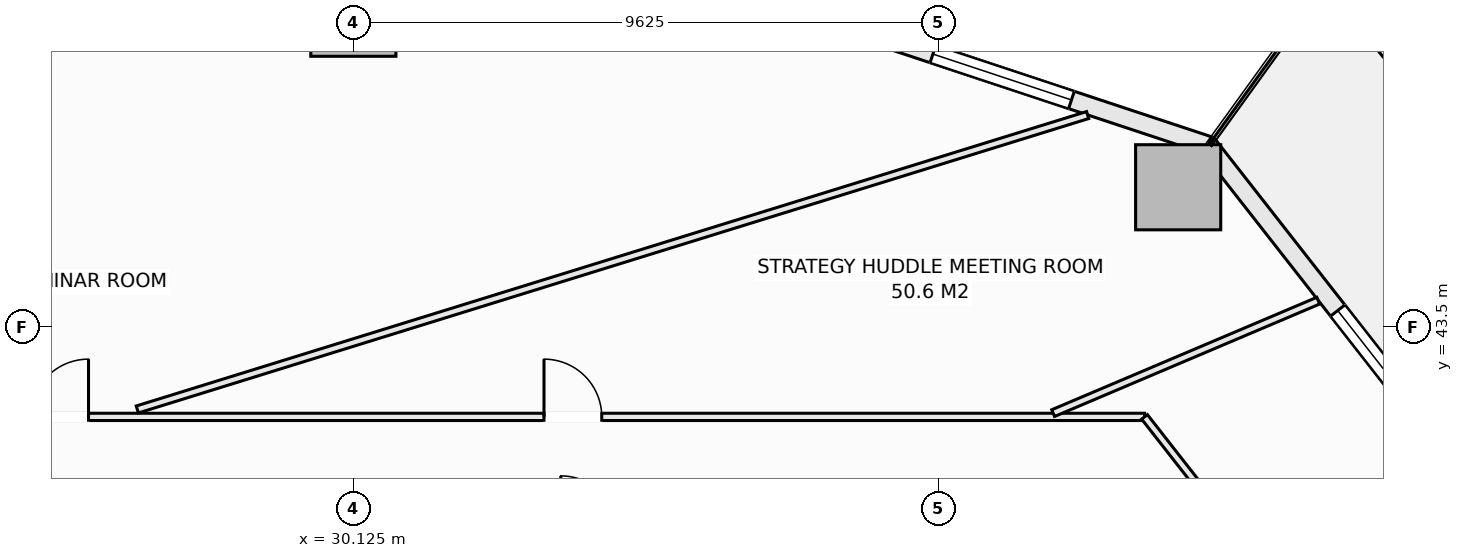
"""IFC4 building model, lengths in metres.
Left out: names, types, materials, properties, quantities, classifications, styles, units other than length and angle.
Written with IfcOpenShell. Run it as: python <this file> out.ifc"""

import sys

from ifc_helpers import new_model, si_unit, direction, frame, frame_2d, origin, origin_2d, place, context, subcontext, project, spatial, rectangle, extrude, element, fill, save


model = new_model("IFC4")
c1 = context("Model", 3, precision=1e-05, world=origin(), true_north=direction((0.0, 1.0)))
c2 = subcontext(c1, "Body", "Model", "MODEL_VIEW")
j1 = project(units=[si_unit("LENGTHUNIT", "METRE"), si_unit("PLANEANGLEUNIT", "RADIAN")], contexts=[c1])
p1 = place(None, origin())
s1 = spatial("IfcSite", under=j1, at=p1, CompositionType="ELEMENT")
p2 = place(p1, origin())
s2 = spatial("IfcBuilding", under=s1, at=p2, CompositionType="ELEMENT")
p3 = place(p2, frame((0.0, 0.0, 41.9)))
s3 = spatial("IfcBuildingStorey", under=s2, at=p3, CompositionType="ELEMENT", Elevation=41.9)
for number, where, z_axis, x_axis in (
    (1, (43.69, 45.796, -0.28), (0.0, 0.0, 1.0), (1.0, 0.0, 0.0)),
    (2, (30.125, 48.65, -0.28), (0.0, 0.0, 1.0), (1.0, 0.0, 0.0)),
):
    element("IfcColumn", number, at=place(p3, frame(where, z_axis=z_axis, x_axis=x_axis)), inside=s3, PredefinedType="COLUMN", context=c2, shape_type="SweptSolid", body=[
        extrude(rectangle(XDim=1.4, YDim=1.4, at=origin_2d()), origin(), (0.0, 0.0, 1.0), 3.85),
    ])
p4 = place(p3, frame((44.188, 46.486, 0.0), z_axis=(0.0, 0.0, 1.0), x_axis=(0.616421309777, -0.787416515482, 0.0)))
e3 = element("IfcWall", 3, at=p4, inside=s3, PredefinedType="SOLIDWALL", context=c2, shape_type="SweptSolid", body=[
    extrude(rectangle(XDim=6.696, YDim=0.3, at=frame_2d((3.348, 0.0))), origin(), (0.0, 0.0, 1.0), 3.093),
])
p5 = place(p4, frame((3.45, 0.0, 0.85)))
e4 = element("IfcOpeningElement", 4, at=p5, cuts=e3, PredefinedType="OPENING", context=c2, shape_type="SweptSolid", body=[
    extrude(rectangle(XDim=2.4, YDim=1.9, at=frame_2d((1.2, 0.95))), frame((0.0, 0.16, 0.0), z_axis=(0.0, -1.0, 0.0), x_axis=(1.0, 0.0, 0.0)), (0.0, 0.0, 1.0), 0.32),
])
p6 = place(p3, frame((37.404, 48.733, 0.0), z_axis=(0.0, 0.0, 1.0), x_axis=(0.949238715533, -0.31455661006, 0.0)))
e5 = element("IfcWall", 5, at=p6, inside=s3, PredefinedType="SOLIDWALL", context=c2, shape_type="SweptSolid", body=[
    extrude(rectangle(XDim=7.146, YDim=0.3, at=frame_2d((3.573, 0.0))), origin(), (0.0, 0.0, 1.0), 3.093),
])
p7 = place(p6, frame((2.373, 0.0, 0.85)))
e6 = element("IfcOpeningElement", 6, at=p7, cuts=e5, PredefinedType="OPENING", context=c2, shape_type="SweptSolid", body=[
    extrude(rectangle(XDim=2.4, YDim=1.9, at=frame_2d((1.2, 0.95))), frame((0.0, 0.16, 0.0), z_axis=(0.0, -1.0, 0.0), x_axis=(1.0, 0.0, 0.0)), (0.0, 0.0, 1.0), 0.32),
])
p8 = place(p3, frame((46.136, 49.251, 0.0), z_axis=(0.0, 0.0, 1.0), x_axis=(0.630997450658, -0.775784903993, 0.0)))
e7 = element("IfcWall", 7, at=p8, inside=s3, PredefinedType="PARAPET", context=c2, shape_type="SweptSolid", body=[
    extrude(rectangle(XDim=7.718, YDim=0.22, at=frame_2d((3.859, 0.0))), origin(), (0.0, 0.0, 1.0), 0.52),
])
p9 = place(p3, frame((23.462, 42.02, 0.0), z_axis=(0.0, 0.0, 1.0), x_axis=(1.0, 0.0, 0.0)))
e8 = element("IfcWall", 8, at=p9, inside=s3, PredefinedType="PARTITIONING", context=c2, shape_type="SweptSolid", body=[
    extrude(rectangle(XDim=19.675, YDim=0.12, at=frame_2d((9.837, 0.0))), origin(), (0.0, 0.0, 1.0), 3.57),
])
p10 = place(p9, frame((9.798, 0.0, 0.0)))
e9 = element("IfcOpeningElement", 9, at=p10, cuts=e8, PredefinedType="OPENING", context=c2, shape_type="SweptSolid", body=[
    extrude(rectangle(XDim=0.95, YDim=2.1, at=frame_2d((0.475, 1.05))), frame((0.0, 0.07, 0.0), z_axis=(0.0, -1.0, 0.0), x_axis=(1.0, 0.0, 0.0)), (0.0, 0.0, 1.0), 0.14),
])
p11 = place(p9, frame((1.357, 0.0, 0.0)))
e10 = element("IfcOpeningElement", 10, at=p11, cuts=e8, PredefinedType="OPENING", context=c2, shape_type="SweptSolid", body=[
    extrude(rectangle(XDim=0.95, YDim=2.1, at=frame_2d((0.475, 1.05))), frame((0.0, 0.07, 0.0), z_axis=(0.0, -1.0, 0.0), x_axis=(1.0, 0.0, 0.0)), (0.0, 0.0, 1.0), 0.14),
])
p12 = place(p3, frame((43.137, 42.02, 0.0), z_axis=(0.0, 0.0, 1.0), x_axis=(0.616441660183, -0.787400583941, 0.0)))
e11 = element("IfcWall", 11, at=p12, inside=s3, PredefinedType="PARTITIONING", context=c2, shape_type="SweptSolid", body=[
    extrude(rectangle(XDim=5.083, YDim=0.12, at=frame_2d((2.541, 0.0))), origin(), (0.0, 0.0, 1.0), 3.57),
])
p13 = place(p3, frame((41.634, 42.082, 0.0), z_axis=(0.0, 0.0, 1.0), x_axis=(0.920618281514, 0.39046380081, 0.0)))
e12 = element("IfcWall", 12, at=p13, inside=s3, PredefinedType="PARTITIONING", context=c2, shape_type="SweptSolid", body=[
    extrude(rectangle(XDim=4.736, YDim=0.12, at=frame_2d((2.368, 0.0))), origin(), (0.0, 0.0, 1.0), 3.57),
])
p14 = place(p3, frame((26.572, 42.142, 0.0), z_axis=(0.0, 0.0, 1.0), x_axis=(0.955220139549, 0.295896071282, 0.0)))
e13 = element("IfcWall", 13, at=p14, inside=s3, PredefinedType="PARTITIONING", context=c2, shape_type="SweptSolid", body=[
    extrude(rectangle(XDim=16.362, YDim=0.12, at=frame_2d((8.181, 0.0))), origin(), (0.0, 0.0, 1.0), 3.093),
])
p15 = place(p5, origin())
e14 = element("IfcWindow", 14, at=p15, inside=s3, PartitioningType="SINGLE_PANEL", PredefinedType="WINDOW", context=c2, shape_type="SweptSolid", body=[
    extrude(rectangle(XDim=2.4, YDim=1.9, at=frame_2d((1.2, 0.95))), frame((0.0, 0.03, 0.0), z_axis=(0.0, -1.0, 0.0), x_axis=(1.0, 0.0, 0.0)), (0.0, 0.0, 1.0), 0.06),
])
fill(e4, e14)
p16 = place(p7, origin())
e15 = element("IfcWindow", 15, at=p16, inside=s3, PartitioningType="SINGLE_PANEL", PredefinedType="WINDOW", context=c2, shape_type="SweptSolid", body=[
    extrude(rectangle(XDim=2.4, YDim=1.9, at=frame_2d((1.2, 0.95))), frame((0.0, 0.03, 0.0), z_axis=(0.0, -1.0, 0.0), x_axis=(1.0, 0.0, 0.0)), (0.0, 0.0, 1.0), 0.06),
])
fill(e6, e15)
p17 = place(p10, origin())
e16 = element("IfcDoor", 16, at=p17, inside=s3, OperationType="SINGLE_SWING_LEFT", PredefinedType="DOOR", context=c2, shape_type="SweptSolid", body=[
    extrude(rectangle(XDim=0.95, YDim=2.1, at=frame_2d((0.475, 1.05))), frame((0.0, 0.025, 0.0), z_axis=(0.0, -1.0, 0.0), x_axis=(1.0, 0.0, 0.0)), (0.0, 0.0, 1.0), 0.05),
])
fill(e9, e16)
p18 = place(p11, origin())
e17 = element("IfcDoor", 17, at=p18, inside=s3, OperationType="SINGLE_SWING_RIGHT", PredefinedType="DOOR", context=c2, shape_type="SweptSolid", body=[
    extrude(rectangle(XDim=0.95, YDim=2.1, at=frame_2d((0.475, 1.05))), frame((0.0, 0.025, 0.0), z_axis=(0.0, -1.0, 0.0), x_axis=(1.0, 0.0, 0.0)), (0.0, 0.0, 1.0), 0.05),
])
fill(e10, e17)
save(model, sys.argv[1])
